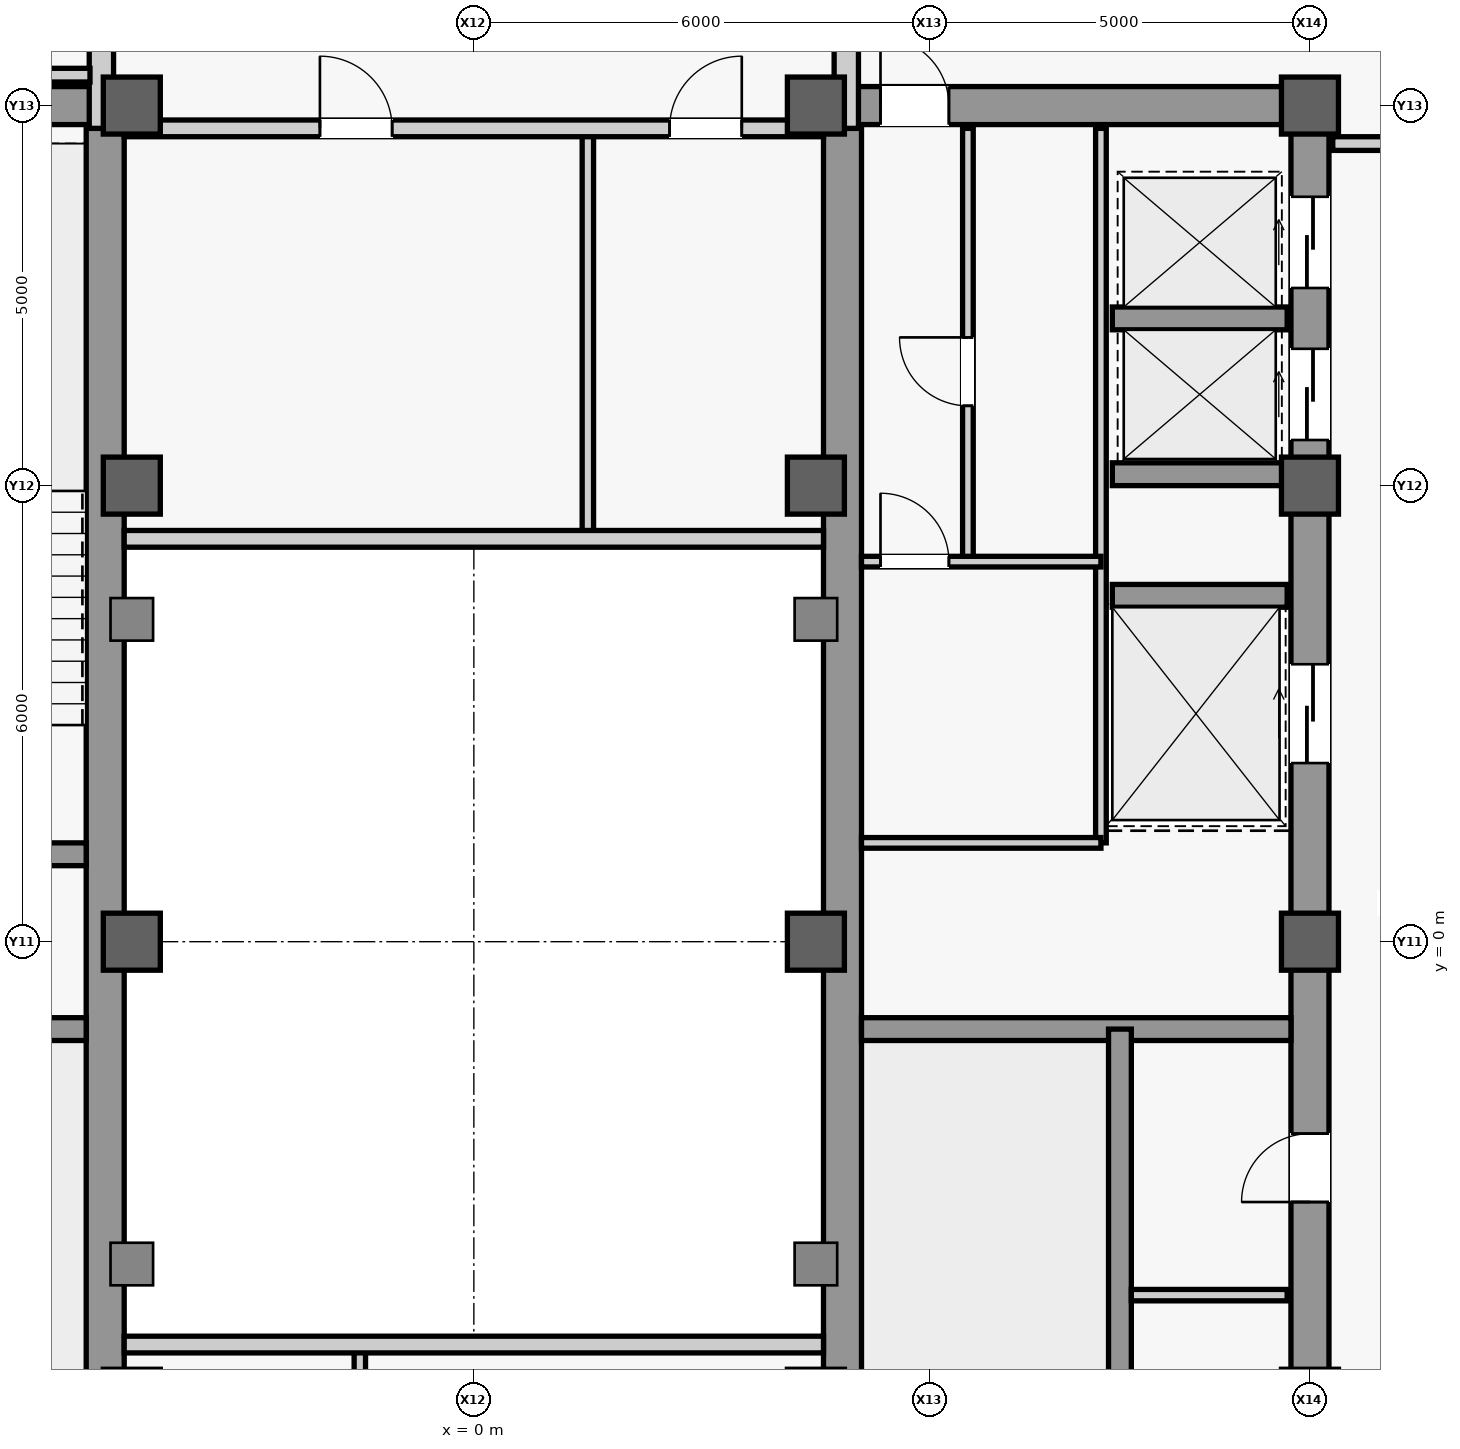
"""IFC4 building model, lengths in metres.
Left out: names, types, materials, properties, quantities, classifications, styles, units other than length and angle.
Written with IfcOpenShell. Run it as: python <this file> out.ifc"""

import sys

from ifc_helpers import new_model, si_unit, direction, frame, frame_2d, origin, origin_2d, place, context, subcontext, project, spatial, rectangle, extrude, source, transform, mapped, element, fill, save


model = new_model("IFC4")
c1 = context("Model", 3, precision=1e-05, world=origin(), true_north=direction((0.0, 1.0)))
c2 = subcontext(c1, "Body", "Model", "MODEL_VIEW")
j1 = project(units=[si_unit("LENGTHUNIT", "METRE"), si_unit("PLANEANGLEUNIT", "RADIAN")], contexts=[c1])
p1 = place(None, origin())
s1 = spatial("IfcSite", under=j1, at=p1, CompositionType="ELEMENT")
p2 = place(p1, origin())
s2 = spatial("IfcBuilding", under=s1, at=p2, CompositionType="ELEMENT")
p3 = place(p2, frame((0.0, 0.0, 354.3)))
s3 = spatial("IfcBuildingStorey", under=s2, at=p3, CompositionType="ELEMENT", Elevation=354.3)
m1 = source(origin(), c2, "Body", "SweptSolid", [
    extrude(rectangle(XDim=22.0, YDim=0.5, at=frame_2d((11.0, 0.0))), origin(), (0.0, 0.0, 1.0), 3.74),
])
p4 = place(p3, frame((11.0, -11.0, 0.0), z_axis=(0.0, 0.0, 1.0), x_axis=(0.0, 1.0, 0.0)))
e1 = element("IfcWall", 1, at=p4, inside=s3, PredefinedType="SHEAR", context=c2, shape_type="MappedRepresentation", body=[
    mapped(m1, transform((0.0, 0.0, 0.0), scale=1.0)),
])
m2 = source(origin(), c2, "Body", "SweptSolid", [
    extrude(rectangle(XDim=1.1, YDim=2.2, at=frame_2d((0.55, 1.1))), frame((0.0, 0.26, 0.0), z_axis=(0.0, -1.0, 0.0), x_axis=(1.0, 0.0, 0.0)), (0.0, 0.0, 1.0), 0.52),
])
p5 = place(p4, frame((0.8, 0.0, 0.0)))
e2 = element("IfcOpeningElement", 2, at=p5, cuts=e1, PredefinedType="OPENING", context=c2, shape_type="MappedRepresentation", body=[
    mapped(m2, transform((0.0, 0.0, 0.0), scale=1.0)),
])
m3 = source(origin(), c2, "Body", "SweptSolid", [
    extrude(rectangle(XDim=0.9, YDim=2.15, at=frame_2d((0.45, 1.075))), frame((0.0, 0.26, 0.0), z_axis=(0.0, -1.0, 0.0), x_axis=(1.0, 0.0, 0.0)), (0.0, 0.0, 1.0), 0.52),
])
p6 = place(p4, frame((7.575, 0.0, 0.0)))
e3 = element("IfcOpeningElement", 3, at=p6, cuts=e1, PredefinedType="OPENING", context=c2, shape_type="MappedRepresentation", body=[
    mapped(m3, transform((0.0, 0.0, 0.0), scale=1.0)),
])
m4 = source(origin(), c2, "Body", "SweptSolid", [
    extrude(rectangle(XDim=1.2, YDim=2.3, at=frame_2d((0.6, 1.15))), frame((0.0, 0.26, 0.0), z_axis=(0.0, -1.0, 0.0), x_axis=(1.0, 0.0, 0.0)), (0.0, 0.0, 1.0), 0.52),
])
p7 = place(p4, frame((17.6, 0.0, 0.0)))
e4 = element("IfcOpeningElement", 4, at=p7, cuts=e1, PredefinedType="OPENING", context=c2, shape_type="MappedRepresentation", body=[
    mapped(m4, transform((0.0, 0.0, 0.0), scale=1.0)),
])
p8 = place(p4, frame((19.6, 0.0, 0.0)))
e5 = element("IfcOpeningElement", 5, at=p8, cuts=e1, PredefinedType="OPENING", context=c2, shape_type="MappedRepresentation", body=[
    mapped(m4, transform((0.0, 0.0, 0.0), scale=1.0)),
])
m5 = source(origin(), c2, "Body", "SweptSolid", [
    extrude(rectangle(XDim=1.3, YDim=2.3, at=frame_2d((0.65, 1.15))), frame((0.0, 0.26, 0.0), z_axis=(0.0, -1.0, 0.0), x_axis=(1.0, 0.0, 0.0)), (0.0, 0.0, 1.0), 0.52),
])
p9 = place(p4, frame((2.7, 0.0, 0.0)))
e6 = element("IfcOpeningElement", 6, at=p9, cuts=e1, PredefinedType="OPENING", context=c2, shape_type="MappedRepresentation", body=[
    mapped(m5, transform((0.0, 0.0, 0.0), scale=1.0)),
])
p10 = place(p4, frame((13.35, 0.0, 0.0)))
e7 = element("IfcOpeningElement", 7, at=p10, cuts=e1, PredefinedType="OPENING", context=c2, shape_type="MappedRepresentation", body=[
    mapped(m5, transform((0.0, 0.0, 0.0), scale=1.0)),
])
m6 = source(origin(), c2, "Body", "SweptSolid", [
    extrude(rectangle(XDim=21.4, YDim=0.5, at=frame_2d((10.7, 0.0))), origin(), (0.0, 0.0, 1.0), 3.74),
])
for number, where, z_axis, x_axis in (
    (8, (-4.85, -10.7, 0.0), (0.0, 0.0, 1.0), (0.0, 1.0, 0.0)),
    (9, (4.85, -10.7, 0.0), (0.0, 0.0, 1.0), (0.0, 1.0, 0.0)),
):
    element("IfcWall", number, at=place(p3, frame(where, z_axis=z_axis, x_axis=x_axis)), inside=s3, PredefinedType="SHEAR", context=c2, shape_type="MappedRepresentation", body=[
        mapped(m6, transform((0.0, 0.0, 0.0), scale=1.0)),
    ])
m7 = source(origin(), c2, "Body", "SweptSolid", [
    extrude(rectangle(XDim=5.9, YDim=0.5, at=frame_2d((2.95, 0.0))), origin(), (0.0, 0.0, 1.0), 3.74),
])
p11 = place(p3, frame((-10.75, 11.0, 0.0), z_axis=(0.0, 0.0, 1.0), x_axis=(1.0, 0.0, 0.0)))
e10 = element("IfcWall", 10, at=p11, inside=s3, PredefinedType="SHEAR", context=c2, shape_type="MappedRepresentation", body=[
    mapped(m7, transform((0.0, 0.0, 0.0), scale=1.0)),
])
p12 = place(p3, frame((4.85, 11.0, 0.0), z_axis=(0.0, 0.0, 1.0), x_axis=(1.0, 0.0, 0.0)))
e11 = element("IfcWall", 11, at=p12, inside=s3, PredefinedType="SHEAR", context=c2, shape_type="MappedRepresentation", body=[
    mapped(m7, transform((0.0, 0.0, 0.0), scale=1.0)),
])
p13 = place(p12, frame((0.5, 0.0, 0.0)))
e12 = element("IfcOpeningElement", 12, at=p13, cuts=e11, PredefinedType="OPENING", context=c2, shape_type="MappedRepresentation", body=[
    mapped(m3, transform((0.0, 0.0, 0.0), scale=1.0)),
])
m8 = source(origin(), c2, "Body", "SweptSolid", [
    extrude(rectangle(XDim=5.65, YDim=0.3, at=frame_2d((2.825, 0.0))), origin(), (0.0, 0.0, 1.0), 3.74),
])
for number, where, z_axis, x_axis in (
    (13, (-10.75, -1.15, 0.0), (0.0, 0.0, 1.0), (1.0, 0.0, 0.0)),
    (14, (-10.75, 1.15, 0.0), (0.0, 0.0, 1.0), (1.0, 0.0, 0.0)),
    (15, (5.1, -1.15, 0.0), (0.0, 0.0, 1.0), (1.0, 0.0, 0.0)),
):
    element("IfcWall", number, at=place(p3, frame(where, z_axis=z_axis, x_axis=x_axis)), inside=s3, PredefinedType="SHEAR", context=c2, shape_type="MappedRepresentation", body=[
        mapped(m8, transform((0.0, 0.0, 0.0), scale=1.0)),
    ])
m9 = source(origin(), c2, "Body", "SweptSolid", [
    extrude(rectangle(XDim=0.75, YDim=0.75, at=origin_2d()), origin(), (0.0, 0.0, 1.0), 4.0),
])
for number, where, z_axis, x_axis in (
    (16, (-4.5, -6.0, 0.0), (0.0, 0.0, 1.0), (1.0, 0.0, 0.0)),
    (17, (-4.5, 0.0, 0.0), (0.0, 0.0, 1.0), (1.0, 0.0, 0.0)),
    (18, (-4.5, 6.0, 0.0), (0.0, 0.0, 1.0), (1.0, 0.0, 0.0)),
    (19, (-4.5, 11.0, 0.0), (0.0, 0.0, 1.0), (1.0, 0.0, 0.0)),
    (20, (4.5, -6.0, 0.0), (0.0, 0.0, 1.0), (1.0, 0.0, 0.0)),
    (21, (4.5, 0.0, 0.0), (0.0, 0.0, 1.0), (1.0, 0.0, 0.0)),
    (22, (4.5, 6.0, 0.0), (0.0, 0.0, 1.0), (1.0, 0.0, 0.0)),
    (23, (4.5, 11.0, 0.0), (0.0, 0.0, 1.0), (1.0, 0.0, 0.0)),
    (24, (11.0, -6.0, 0.0), (0.0, 0.0, 1.0), (1.0, 0.0, 0.0)),
    (25, (11.0, 0.0, 0.0), (0.0, 0.0, 1.0), (1.0, 0.0, 0.0)),
    (26, (11.0, 6.0, 0.0), (0.0, 0.0, 1.0), (1.0, 0.0, 0.0)),
    (27, (11.0, 11.0, 0.0), (0.0, 0.0, 1.0), (1.0, 0.0, 0.0)),
):
    element("IfcColumn", number, at=place(p3, frame(where, z_axis=z_axis, x_axis=x_axis)), inside=s3, PredefinedType="COLUMN", context=c2, shape_type="MappedRepresentation", body=[
        mapped(m9, transform((0.0, 0.0, 0.0), scale=1.0)),
    ])
m10 = source(origin(), c2, "Body", "SweptSolid", [
    extrude(rectangle(XDim=14.98, YDim=0.32, at=frame_2d((7.49, 0.0))), origin(), (0.0, 0.0, 1.0), 3.045),
])
for number, where, z_axis, x_axis in (
    (28, (-4.9, 10.7, 0.0), (0.0, 0.0, 1.0), (0.0, 1.0, 0.0)),
    (29, (4.9, 10.7, 0.0), (0.0, 0.0, 1.0), (0.0, 1.0, 0.0)),
):
    element("IfcWall", number, at=place(p3, frame(where, z_axis=z_axis, x_axis=x_axis)), inside=s3, PredefinedType="STANDARD", context=c2, shape_type="MappedRepresentation", body=[
        mapped(m10, transform((0.0, 0.0, 0.0), scale=1.0)),
    ])
m11 = source(origin(), c2, "Body", "SweptSolid", [
    extrude(rectangle(XDim=7.8, YDim=0.3, at=frame_2d((3.9, 0.0))), origin(), (0.0, 0.0, 1.0), 3.74),
])
p14 = place(p3, frame((8.5, -8.95, 0.0), z_axis=(0.0, 0.0, 1.0), x_axis=(0.0, 1.0, 0.0)))
e30 = element("IfcWall", 30, at=p14, inside=s3, PredefinedType="SHEAR", context=c2, shape_type="MappedRepresentation", body=[
    mapped(m11, transform((0.0, 0.0, 0.0), scale=1.0)),
])
m12 = source(origin(), c2, "Body", "SweptSolid", [
    extrude(rectangle(XDim=2.3, YDim=0.3, at=frame_2d((1.15, 0.0))), origin(), (0.0, 0.0, 1.0), 3.74),
])
for number, where, z_axis, x_axis in (
    (31, (8.4, 4.55, 0.0), (0.0, 0.0, 1.0), (1.0, 0.0, 0.0)),
    (32, (8.4, 6.15, 0.0), (0.0, 0.0, 1.0), (1.0, 0.0, 0.0)),
    (33, (8.4, 8.2, 0.0), (0.0, 0.0, 1.0), (1.0, 0.0, 0.0)),
):
    element("IfcWall", number, at=place(p3, frame(where, z_axis=z_axis, x_axis=x_axis)), inside=s3, PredefinedType="SHEAR", context=c2, shape_type="MappedRepresentation", body=[
        mapped(m12, transform((0.0, 0.0, 0.0), scale=1.0)),
    ])
m13 = source(origin(), c2, "Body", "SweptSolid", [
    extrude(rectangle(XDim=2.05, YDim=0.15, at=frame_2d((1.025, 0.0))), origin(), (0.0, 0.0, 1.0), 3.74),
])
p15 = place(p3, frame((8.65, -4.65, 0.0), z_axis=(0.0, 0.0, 1.0), x_axis=(1.0, 0.0, 0.0)))
e34 = element("IfcWall", 34, at=p15, inside=s3, PredefinedType="PARTITIONING", context=c2, shape_type="MappedRepresentation", body=[
    mapped(m13, transform((0.0, 0.0, 0.0), scale=1.0)),
])
m14 = source(origin(), c2, "Body", "SweptSolid", [
    extrude(rectangle(XDim=9.4, YDim=0.14, at=frame_2d((4.7, 0.0))), origin(), (0.0, 0.0, 1.0), 3.74),
])
p16 = place(p3, frame((8.25, 1.3, 0.0), z_axis=(0.0, 0.0, 1.0), x_axis=(0.0, 1.0, 0.0)))
e35 = element("IfcWall", 35, at=p16, inside=s3, PredefinedType="PARTITIONING", context=c2, shape_type="MappedRepresentation", body=[
    mapped(m14, transform((0.0, 0.0, 0.0), scale=1.0)),
])
m15 = source(origin(), c2, "Body", "SweptSolid", [
    extrude(rectangle(XDim=3.15, YDim=0.14, at=frame_2d((1.575, 0.0))), origin(), (0.0, 0.0, 1.0), 3.74),
])
p17 = place(p3, frame((5.1, 1.3, 0.0), z_axis=(0.0, 0.0, 1.0), x_axis=(1.0, 0.0, 0.0)))
e36 = element("IfcWall", 36, at=p17, inside=s3, PredefinedType="PARTITIONING", context=c2, shape_type="MappedRepresentation", body=[
    mapped(m15, transform((0.0, 0.0, 0.0), scale=1.0)),
])
m16 = source(origin(), c2, "Body", "SweptSolid", [
    extrude(rectangle(XDim=5.7, YDim=0.14, at=frame_2d((2.85, 0.0))), origin(), (0.0, 0.0, 1.0), 3.74),
])
p18 = place(p3, frame((6.5, 5.0, 0.0), z_axis=(0.0, 0.0, 1.0), x_axis=(0.0, 1.0, 0.0)))
e37 = element("IfcWall", 37, at=p18, inside=s3, PredefinedType="PARTITIONING", context=c2, shape_type="MappedRepresentation", body=[
    mapped(m16, transform((0.0, 0.0, 0.0), scale=1.0)),
])
m17 = source(origin(), c2, "Body", "SweptSolid", [
    extrude(rectangle(XDim=0.9, YDim=2.15, at=frame_2d((0.45, 1.075))), frame((0.0, 0.08, 0.0), z_axis=(0.0, -1.0, 0.0), x_axis=(1.0, 0.0, 0.0)), (0.0, 0.0, 1.0), 0.16),
])
p19 = place(p18, frame((2.05, 0.0, 0.0)))
e38 = element("IfcOpeningElement", 38, at=p19, cuts=e37, PredefinedType="OPENING", context=c2, shape_type="MappedRepresentation", body=[
    mapped(m17, transform((0.0, 0.0, 0.0), scale=1.0)),
])
p20 = place(p3, frame((5.1, 5.0, 0.0), z_axis=(0.0, 0.0, 1.0), x_axis=(1.0, 0.0, 0.0)))
e39 = element("IfcWall", 39, at=p20, inside=s3, PredefinedType="PARTITIONING", context=c2, shape_type="MappedRepresentation", body=[
    mapped(m15, transform((0.0, 0.0, 0.0), scale=1.0)),
])
p21 = place(p20, frame((0.25, 0.0, 0.0)))
e40 = element("IfcOpeningElement", 40, at=p21, cuts=e39, PredefinedType="OPENING", context=c2, shape_type="MappedRepresentation", body=[
    mapped(m17, transform((0.0, 0.0, 0.0), scale=1.0)),
])
m18 = source(origin(), c2, "Body", "SweptSolid", [
    extrude(rectangle(XDim=4.05, YDim=0.18, at=frame_2d((2.025, 0.0))), origin(), (0.0, 0.0, 1.0), 3.74),
])
p22 = place(p3, frame((11.3, 10.5, 0.0), z_axis=(0.0, 0.0, 1.0), x_axis=(1.0, 0.0, 0.0)))
e41 = element("IfcWall", 41, at=p22, inside=s3, PredefinedType="PARTITIONING", context=c2, shape_type="MappedRepresentation", body=[
    mapped(m18, transform((0.0, 0.0, 0.0), scale=1.0)),
])
m19 = source(origin(), c2, "Body", "SweptSolid", [
    extrude(rectangle(XDim=5.4, YDim=0.15, at=frame_2d((2.7, 0.0))), origin(), (0.0, 0.0, 1.0), 3.74),
])
p23 = place(p3, frame((-1.5, -10.7, 0.0), z_axis=(0.0, 0.0, 1.0), x_axis=(0.0, 1.0, 0.0)))
e42 = element("IfcWall", 42, at=p23, inside=s3, PredefinedType="PARTITIONING", context=c2, shape_type="MappedRepresentation", body=[
    mapped(m19, transform((0.0, 0.0, 0.0), scale=1.0)),
])
m20 = source(origin(), c2, "Body", "SweptSolid", [
    extrude(rectangle(XDim=9.2, YDim=0.22, at=frame_2d((4.6, 0.0))), origin(), (0.0, 0.0, 1.0), 3.74),
])
p24 = place(p3, frame((-4.6, -5.3, 0.0), z_axis=(0.0, 0.0, 1.0), x_axis=(1.0, 0.0, 0.0)))
e43 = element("IfcWall", 43, at=p24, inside=s3, PredefinedType="PARTITIONING", context=c2, shape_type="MappedRepresentation", body=[
    mapped(m20, transform((0.0, 0.0, 0.0), scale=1.0)),
])
p25 = place(p3, frame((1.5, 5.3, 0.0), z_axis=(0.0, 0.0, 1.0), x_axis=(0.0, 1.0, 0.0)))
e44 = element("IfcWall", 44, at=p25, inside=s3, PredefinedType="PARTITIONING", context=c2, shape_type="MappedRepresentation", body=[
    mapped(m19, transform((0.0, 0.0, 0.0), scale=1.0)),
])
p26 = place(p3, frame((-4.6, 5.3, 0.0), z_axis=(0.0, 0.0, 1.0), x_axis=(1.0, 0.0, 0.0)))
e45 = element("IfcWall", 45, at=p26, inside=s3, PredefinedType="PARTITIONING", context=c2, shape_type="MappedRepresentation", body=[
    mapped(m20, transform((0.0, 0.0, 0.0), scale=1.0)),
])
m21 = source(origin(), c2, "Body", "SweptSolid", [
    extrude(rectangle(XDim=9.2, YDim=0.22, at=frame_2d((4.6, 0.0))), origin(), (0.0, 0.0, 1.0), 2.79),
])
p27 = place(p3, frame((-4.6, 10.7, 0.0), z_axis=(0.0, 0.0, 1.0), x_axis=(1.0, 0.0, 0.0)))
e46 = element("IfcWall", 46, at=p27, inside=s3, PredefinedType="PARTITIONING", context=c2, shape_type="MappedRepresentation", body=[
    mapped(m21, transform((0.0, 0.0, 0.0), scale=1.0)),
])
m22 = source(origin(), c2, "Body", "SweptSolid", [
    extrude(rectangle(XDim=0.95, YDim=2.15, at=frame_2d((0.475, 1.075))), frame((0.0, 0.12, 0.0), z_axis=(0.0, -1.0, 0.0), x_axis=(1.0, 0.0, 0.0)), (0.0, 0.0, 1.0), 0.24),
])
p28 = place(p27, frame((2.575, 0.0, 0.0)))
e47 = element("IfcOpeningElement", 47, at=p28, cuts=e46, PredefinedType="OPENING", context=c2, shape_type="MappedRepresentation", body=[
    mapped(m22, transform((0.0, 0.0, 0.0), scale=1.0)),
])
p29 = place(p27, frame((7.175, 0.0, 0.0)))
e48 = element("IfcOpeningElement", 48, at=p29, cuts=e46, PredefinedType="OPENING", context=c2, shape_type="MappedRepresentation", body=[
    mapped(m22, transform((0.0, 0.0, 0.0), scale=1.0)),
])
m23 = source(origin(), c2, "Body", "SweptSolid", [
    extrude(rectangle(XDim=12.7, YDim=0.18, at=frame_2d((6.35, 0.0))), origin(), (0.0, 0.0, 1.0), 2.79),
])
p30 = place(p3, frame((-17.75, 11.4, 0.0), z_axis=(0.0, 0.0, 1.0), x_axis=(1.0, 0.0, 0.0)))
e49 = element("IfcWall", 49, at=p30, inside=s3, PredefinedType="PARTITIONING", context=c2, shape_type="MappedRepresentation", body=[
    mapped(m23, transform((0.0, 0.0, 0.0), scale=1.0)),
])
m24 = source(origin(), c2, "Body", "SweptSolid", [
    extrude(rectangle(XDim=1.05, YDim=2.2, at=frame_2d((0.525, 1.1))), frame((0.0, 0.1, 0.0), z_axis=(0.0, -1.0, 0.0), x_axis=(1.0, 0.0, 0.0)), (0.0, 0.0, 1.0), 0.2),
])
p31 = place(p30, frame((0.675, 0.0, 0.0)))
e50 = element("IfcOpeningElement", 50, at=p31, cuts=e49, PredefinedType="OPENING", context=c2, shape_type="MappedRepresentation", body=[
    mapped(m24, transform((0.0, 0.0, 0.0), scale=1.0)),
])
m25 = source(origin(), c2, "Body", "SweptSolid", [
    extrude(rectangle(XDim=0.9, YDim=2.15, at=frame_2d((0.45, 1.075))), frame((0.0, 0.025, 0.0), z_axis=(0.0, -1.0, 0.0), x_axis=(1.0, 0.0, 0.0)), (0.0, 0.0, 1.0), 0.05),
])
p32 = place(p6, origin())
e51 = element("IfcDoor", 51, at=p32, inside=s3, OperationType="SINGLE_SWING_LEFT", PredefinedType="DOOR", context=c2, shape_type="MappedRepresentation", body=[
    mapped(m25, transform((0.0, 0.0, 0.0), scale=1.0)),
])
fill(e3, e51)
p33 = place(p13, origin())
e52 = element("IfcDoor", 52, at=p33, inside=s3, OperationType="SINGLE_SWING_LEFT", PredefinedType="DOOR", context=c2, shape_type="MappedRepresentation", body=[
    mapped(m25, transform((0.0, 0.0, 0.0), scale=1.0)),
])
fill(e12, e52)
p34 = place(p19, origin())
e53 = element("IfcDoor", 53, at=p34, inside=s3, OperationType="SINGLE_SWING_RIGHT", PredefinedType="DOOR", context=c2, shape_type="MappedRepresentation", body=[
    mapped(m25, transform((0.0, 0.0, 0.0), scale=1.0)),
])
fill(e38, e53)
p35 = place(p21, origin())
e54 = element("IfcDoor", 54, at=p35, inside=s3, OperationType="SINGLE_SWING_LEFT", PredefinedType="DOOR", context=c2, shape_type="MappedRepresentation", body=[
    mapped(m25, transform((0.0, 0.0, 0.0), scale=1.0)),
])
fill(e40, e54)
m26 = source(origin(), c2, "Body", "SweptSolid", [
    extrude(rectangle(XDim=0.95, YDim=2.15, at=frame_2d((0.475, 1.075))), frame((0.0, 0.025, 0.0), z_axis=(0.0, -1.0, 0.0), x_axis=(1.0, 0.0, 0.0)), (0.0, 0.0, 1.0), 0.05),
])
p36 = place(p28, origin())
e55 = element("IfcDoor", 55, at=p36, inside=s3, OperationType="SINGLE_SWING_LEFT", PredefinedType="DOOR", context=c2, shape_type="MappedRepresentation", body=[
    mapped(m26, transform((0.0, 0.0, 0.0), scale=1.0)),
])
fill(e47, e55)
p37 = place(p29, origin())
e56 = element("IfcDoor", 56, at=p37, inside=s3, OperationType="SINGLE_SWING_RIGHT", PredefinedType="DOOR", context=c2, shape_type="MappedRepresentation", body=[
    mapped(m26, transform((0.0, 0.0, 0.0), scale=1.0)),
])
fill(e48, e56)
m27 = source(origin(), c2, "Body", "SweptSolid", [
    extrude(rectangle(XDim=1.2, YDim=2.3, at=frame_2d((0.6, 1.15))), frame((0.0, 0.025, 0.0), z_axis=(0.0, -1.0, 0.0), x_axis=(1.0, 0.0, 0.0)), (0.0, 0.0, 1.0), 0.05),
])
p38 = place(p7, origin())
e57 = element("IfcDoor", 57, at=p38, inside=s3, OperationType="SLIDING_TO_LEFT", PredefinedType="DOOR", context=c2, shape_type="MappedRepresentation", body=[
    mapped(m27, transform((0.0, 0.0, 0.0), scale=1.0)),
])
fill(e4, e57)
p39 = place(p8, origin())
e58 = element("IfcDoor", 58, at=p39, inside=s3, OperationType="SLIDING_TO_LEFT", PredefinedType="DOOR", context=c2, shape_type="MappedRepresentation", body=[
    mapped(m27, transform((0.0, 0.0, 0.0), scale=1.0)),
])
fill(e5, e58)
m28 = source(origin(), c2, "Body", "SweptSolid", [
    extrude(rectangle(XDim=1.3, YDim=2.3, at=frame_2d((0.65, 1.15))), frame((0.0, 0.025, 0.0), z_axis=(0.0, -1.0, 0.0), x_axis=(1.0, 0.0, 0.0)), (0.0, 0.0, 1.0), 0.05),
])
p40 = place(p10, origin())
e59 = element("IfcDoor", 59, at=p40, inside=s3, OperationType="SLIDING_TO_LEFT", PredefinedType="DOOR", context=c2, shape_type="MappedRepresentation", body=[
    mapped(m28, transform((0.0, 0.0, 0.0), scale=1.0)),
])
fill(e7, e59)
save(model, sys.argv[1])
